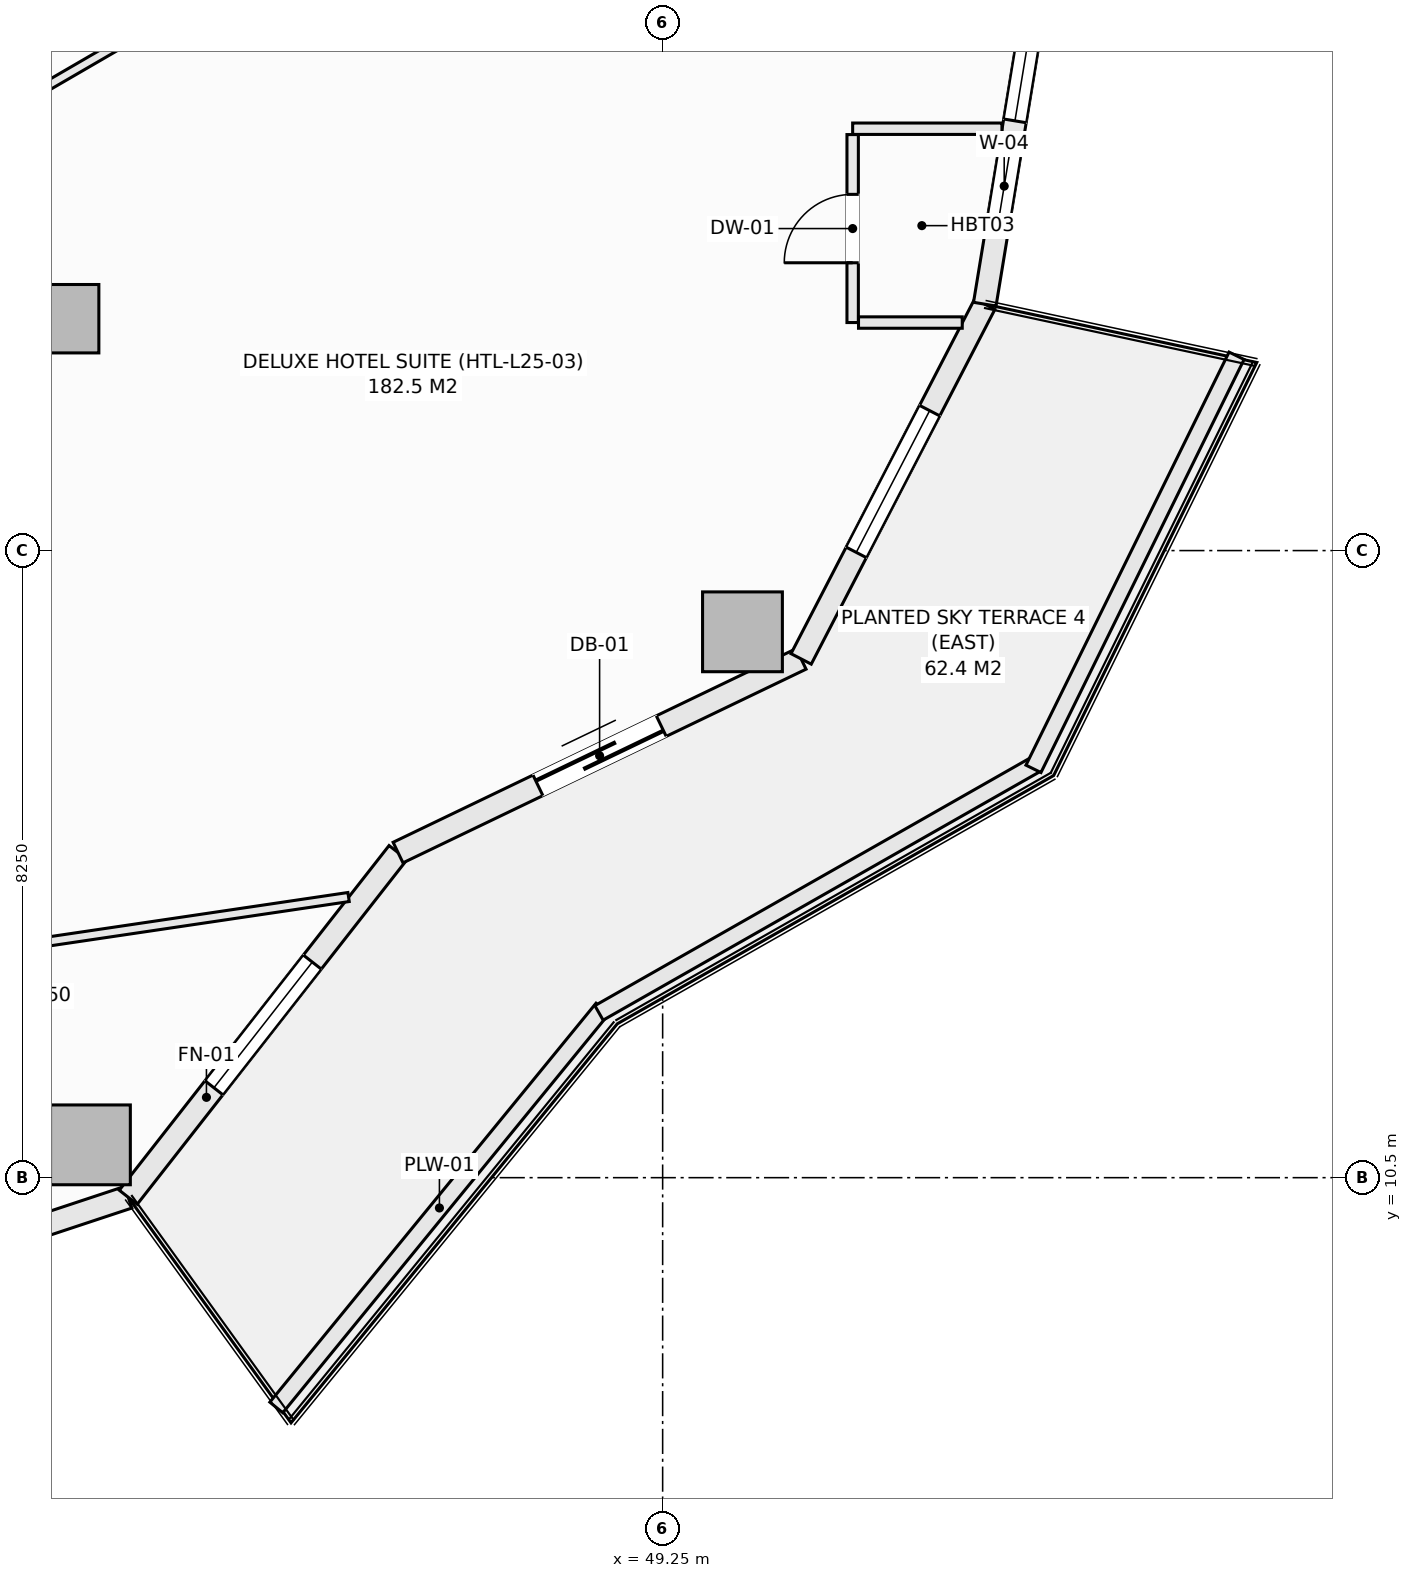
"""IFC4 building model, lengths in metres.
Left out: names, types, materials, properties, quantities, classifications, styles, units other than length and angle.
Written with IfcOpenShell. Run it as: python <this file> out.ifc"""

import sys

from ifc_helpers import new_model, si_unit, direction, frame, frame_2d, origin, origin_2d, place, context, subcontext, project, spatial, rectangle, extrude, element, fill, save


model = new_model("IFC4")
c1 = context("Model", 3, precision=1e-05, world=origin(), true_north=direction((0.0, 1.0)))
c2 = subcontext(c1, "Body", "Model", "MODEL_VIEW")
j1 = project(units=[si_unit("LENGTHUNIT", "METRE"), si_unit("PLANEANGLEUNIT", "RADIAN")], contexts=[c1])
p1 = place(None, origin())
s1 = spatial("IfcSite", under=j1, at=p1, CompositionType="ELEMENT")
p2 = place(p1, origin())
s2 = spatial("IfcBuilding", under=s1, at=p2, CompositionType="ELEMENT")
p3 = place(p2, frame((0.0, 0.0, 105.3)))
s3 = spatial("IfcBuildingStorey", under=s2, at=p3, CompositionType="ELEMENT", Elevation=105.3)
for number, where, z_axis, x_axis in (
    (1, (41.721, 10.932, -0.27), (0.0, 0.0, 1.0), (1.0, 0.0, 0.0)),
    (2, (50.3, 17.681, -0.27), (0.0, 0.0, 1.0), (1.0, 0.0, 0.0)),
):
    element("IfcColumn", number, at=place(p3, frame(where, z_axis=z_axis, x_axis=x_axis)), inside=s3, PredefinedType="COLUMN", context=c2, shape_type="SweptSolid", body=[
        extrude(rectangle(XDim=1.05, YDim=1.05, at=origin_2d()), origin(), (0.0, 0.0, 1.0), 3.4),
    ])
p4 = place(p3, frame((41.382, 21.801, -0.27), z_axis=(0.0, 0.0, 1.0), x_axis=(1.0, 0.0, 0.0)))
e3 = element("IfcColumn", 3, at=p4, inside=s3, PredefinedType="COLUMN", context=c2, shape_type="SweptSolid", body=[
    extrude(rectangle(XDim=0.9, YDim=0.9, at=origin_2d()), origin(), (0.0, 0.0, 1.0), 3.4),
])
p5 = place(p3, frame((36.385, 8.309, 0.0), z_axis=(0.0, 0.0, 1.0), x_axis=(0.949238009374, 0.314558741032, 0.0)))
e4 = element("IfcWall", 4, at=p5, inside=s3, PredefinedType="SOLIDWALL", context=c2, shape_type="SweptSolid", body=[
    extrude(rectangle(XDim=6.146, YDim=0.3, at=frame_2d((3.073, 0.0))), origin(), (0.0, 0.0, 1.0), 2.653),
])
p6 = place(p5, frame((0.685, 0.0, 0.74)))
e5 = element("IfcOpeningElement", 5, at=p6, cuts=e4, PredefinedType="OPENING", context=c2, shape_type="SweptSolid", body=[
    extrude(rectangle(XDim=1.2, YDim=1.7, at=frame_2d((0.6, 0.85))), frame((0.0, 0.16, 0.0), z_axis=(0.0, -1.0, 0.0), x_axis=(1.0, 0.0, 0.0)), (0.0, 0.0, 1.0), 0.32),
])
p7 = place(p5, frame((2.166, 0.0, 0.74)))
e6 = element("IfcOpeningElement", 6, at=p7, cuts=e4, PredefinedType="OPENING", context=c2, shape_type="SweptSolid", body=[
    extrude(rectangle(XDim=1.2, YDim=1.7, at=frame_2d((0.6, 0.85))), frame((0.0, 0.16, 0.0), z_axis=(0.0, -1.0, 0.0), x_axis=(1.0, 0.0, 0.0)), (0.0, 0.0, 1.0), 0.32),
])
p8 = place(p3, frame((42.219, 10.242, 0.0), z_axis=(0.0, 0.0, 1.0), x_axis=(0.616435134162, 0.787405693001, 0.0)))
e7 = element("IfcWall", 7, at=p8, inside=s3, PredefinedType="SOLIDWALL", context=c2, shape_type="SweptSolid", body=[
    extrude(rectangle(XDim=5.759, YDim=0.3, at=frame_2d((2.879, 0.0))), origin(), (0.0, 0.0, 1.0), 2.653),
])
p9 = place(p8, frame((1.829, 0.0, 0.74)))
e8 = element("IfcOpeningElement", 8, at=p9, cuts=e7, PredefinedType="OPENING", context=c2, shape_type="SweptSolid", body=[
    extrude(rectangle(XDim=2.1, YDim=1.7, at=frame_2d((1.05, 0.85))), frame((0.0, 0.16, 0.0), z_axis=(0.0, -1.0, 0.0), x_axis=(1.0, 0.0, 0.0)), (0.0, 0.0, 1.0), 0.32),
])
p10 = place(p3, frame((45.769, 14.777, 0.0), z_axis=(0.0, 0.0, 1.0), x_axis=(0.901370184739, 0.433049408339, 0.0)))
e9 = element("IfcWall", 9, at=p10, inside=s3, PredefinedType="SOLIDWALL", context=c2, shape_type="SweptSolid", body=[
    extrude(rectangle(XDim=5.884, YDim=0.3, at=frame_2d((2.942, 0.0))), origin(), (0.0, 0.0, 1.0), 2.653),
])
p11 = place(p10, frame((2.042, 0.0, 0.0)))
e10 = element("IfcOpeningElement", 10, at=p11, cuts=e9, PredefinedType="OPENING", context=c2, shape_type="SweptSolid", body=[
    extrude(rectangle(XDim=1.8, YDim=2.25, at=frame_2d((0.9, 1.125))), frame((0.0, 0.16, 0.0), z_axis=(0.0, -1.0, 0.0), x_axis=(1.0, 0.0, 0.0)), (0.0, 0.0, 1.0), 0.32),
])
p12 = place(p3, frame((51.072, 17.325, 0.0), z_axis=(0.0, 0.0, 1.0), x_axis=(0.459767899643, 0.888039119892, 0.0)))
e11 = element("IfcWall", 11, at=p12, inside=s3, PredefinedType="SOLIDWALL", context=c2, shape_type="SweptSolid", body=[
    extrude(rectangle(XDim=5.255, YDim=0.3, at=frame_2d((2.628, 0.0))), origin(), (0.0, 0.0, 1.0), 2.653),
])
p13 = place(p12, frame((1.578, 0.0, 0.74)))
e12 = element("IfcOpeningElement", 12, at=p13, cuts=e11, PredefinedType="OPENING", context=c2, shape_type="SweptSolid", body=[
    extrude(rectangle(XDim=2.1, YDim=1.7, at=frame_2d((1.05, 0.85))), frame((0.0, 0.16, 0.0), z_axis=(0.0, -1.0, 0.0), x_axis=(1.0, 0.0, 0.0)), (0.0, 0.0, 1.0), 0.32),
])
p14 = place(p3, frame((53.488, 21.992, 0.0), z_axis=(0.0, 0.0, 1.0), x_axis=(0.162393944769, 0.986726003864, 0.0)))
e13 = element("IfcWall", 13, at=p14, inside=s3, PredefinedType="SOLIDWALL", context=c2, shape_type="SweptSolid", body=[
    extrude(rectangle(XDim=5.075, YDim=0.3, at=frame_2d((2.538, 0.0))), origin(), (0.0, 0.0, 1.0), 2.653),
])
p15 = place(p14, frame((0.974, 0.0, 0.74)))
e14 = element("IfcOpeningElement", 14, at=p15, cuts=e13, PredefinedType="OPENING", context=c2, shape_type="SweptSolid", body=[
    extrude(rectangle(XDim=1.2, YDim=1.7, at=frame_2d((0.6, 0.85))), frame((0.0, 0.16, 0.0), z_axis=(0.0, -1.0, 0.0), x_axis=(1.0, 0.0, 0.0)), (0.0, 0.0, 1.0), 0.32),
])
p16 = place(p14, frame((2.444, 0.0, 0.74)))
e15 = element("IfcOpeningElement", 15, at=p16, cuts=e13, PredefinedType="OPENING", context=c2, shape_type="SweptSolid", body=[
    extrude(rectangle(XDim=1.2, YDim=1.7, at=frame_2d((0.6, 0.85))), frame((0.0, 0.16, 0.0), z_axis=(0.0, -1.0, 0.0), x_axis=(1.0, 0.0, 0.0)), (0.0, 0.0, 1.0), 0.32),
])
p17 = place(p3, frame((44.167, 7.477, 0.0), z_axis=(0.0, 0.0, 1.0), x_axis=(0.633002467947, 0.77414977593, 0.0)))
e16 = element("IfcWall", 16, at=p17, inside=s3, PredefinedType="PARAPET", context=c2, shape_type="SweptSolid", body=[
    extrude(rectangle(XDim=6.78, YDim=0.22, at=frame_2d((3.39, 0.0))), origin(), (0.0, 0.0, 1.0), 0.52),
])
p18 = place(p3, frame((48.413, 12.668, 0.0), z_axis=(0.0, 0.0, 1.0), x_axis=(0.869187658335, 0.494482370361, 0.0)))
e17 = element("IfcWall", 17, at=p18, inside=s3, PredefinedType="PARAPET", context=c2, shape_type="SweptSolid", body=[
    extrude(rectangle(XDim=6.606, YDim=0.22, at=frame_2d((3.303, 0.0))), origin(), (0.0, 0.0, 1.0), 0.52),
])
p19 = place(p3, frame((54.129, 15.878, 0.0), z_axis=(0.0, 0.0, 1.0), x_axis=(0.441269631716, 0.897374566235, 0.0)))
e18 = element("IfcWall", 18, at=p19, inside=s3, PredefinedType="PARAPET", context=c2, shape_type="SweptSolid", body=[
    extrude(rectangle(XDim=6.056, YDim=0.22, at=frame_2d((3.028, 0.0))), origin(), (0.0, 0.0, 1.0), 0.52),
])
p20 = place(p3, frame((36.012, 12.843, 0.0), z_axis=(0.0, 0.0, 1.0), x_axis=(0.989205313502, 0.146536165297, 0.0)))
e19 = element("IfcWall", 19, at=p20, inside=s3, PredefinedType="PARTITIONING", context=c2, shape_type="SweptSolid", body=[
    extrude(rectangle(XDim=9.205, YDim=0.12, at=frame_2d((4.603, 0.0))), origin(), (0.0, 0.0, 1.0), 3.13),
])
p21 = place(p3, frame((51.75, 24.3, 0.0), z_axis=(0.0, 0.0, 1.0), x_axis=(1.0, 0.0, 0.0)))
e20 = element("IfcWall", 20, at=p21, inside=s3, PredefinedType="PARTITIONING", context=c2, shape_type="SweptSolid", body=[
    extrude(rectangle(XDim=1.964, YDim=0.15, at=frame_2d((0.982, 0.0))), origin(), (0.0, 0.0, 1.0), 3.13),
])
p22 = place(p3, frame((51.75, 21.75, 0.0), z_axis=(0.0, 0.0, 1.0), x_axis=(0.0, 1.0, 0.0)))
e21 = element("IfcWall", 21, at=p22, inside=s3, PredefinedType="PARTITIONING", context=c2, shape_type="SweptSolid", body=[
    extrude(rectangle(XDim=2.473, YDim=0.15, at=frame_2d((1.236, 0.0))), origin(), (0.0, 0.0, 1.0), 2.653),
])
p23 = place(p22, frame((0.787, 0.0, 0.0)))
e22 = element("IfcOpeningElement", 22, at=p23, cuts=e21, PredefinedType="OPENING", context=c2, shape_type="SweptSolid", body=[
    extrude(rectangle(XDim=0.9, YDim=2.1, at=frame_2d((0.45, 1.05))), frame((0.0, 0.085, 0.0), z_axis=(0.0, -1.0, 0.0), x_axis=(1.0, 0.0, 0.0)), (0.0, 0.0, 1.0), 0.17),
])
p24 = place(p3, frame((51.827, 21.75, 0.0), z_axis=(0.0, 0.0, 1.0), x_axis=(1.0, 0.0, 0.0)))
e23 = element("IfcWall", 23, at=p24, inside=s3, PredefinedType="PARTITIONING", context=c2, shape_type="SweptSolid", body=[
    extrude(rectangle(XDim=1.365, YDim=0.15, at=frame_2d((0.683, 0.0))), origin(), (0.0, 0.0, 1.0), 3.13),
])
p25 = place(p3, frame((38.962, 23.589, 0.0), z_axis=(0.0, 0.0, 1.0), x_axis=(0.864680370076, 0.502322463768, 0.0)))
e24 = element("IfcWall", 24, at=p25, inside=s3, PredefinedType="PARTITIONING", context=c2, shape_type="SweptSolid", body=[
    extrude(rectangle(XDim=16.634, YDim=0.12, at=frame_2d((8.317, 0.0))), origin(), (0.0, 0.0, 1.0), 2.505),
])
p26 = place(p9, origin())
e25 = element("IfcWindow", 25, at=p26, inside=s3, PartitioningType="SINGLE_PANEL", PredefinedType="WINDOW", context=c2, shape_type="SweptSolid", body=[
    extrude(rectangle(XDim=2.1, YDim=1.7, at=frame_2d((1.05, 0.85))), frame((0.0, 0.03, 0.0), z_axis=(0.0, -1.0, 0.0), x_axis=(1.0, 0.0, 0.0)), (0.0, 0.0, 1.0), 0.06),
])
fill(e8, e25)
p27 = place(p11, frame((1.8, 0.0, 0.0), z_axis=(0.0, 0.0, 1.0), x_axis=(-1.0, 0.0, 0.0)))
e26 = element("IfcDoor", 26, at=p27, inside=s3, OperationType="SLIDING_TO_LEFT", PredefinedType="DOOR", context=c2, shape_type="SweptSolid", body=[
    extrude(rectangle(XDim=1.8, YDim=2.25, at=frame_2d((0.9, 1.125))), frame((0.0, 0.025, 0.0), z_axis=(0.0, -1.0, 0.0), x_axis=(1.0, 0.0, 0.0)), (0.0, 0.0, 1.0), 0.05),
])
fill(e10, e26)
p28 = place(p13, origin())
e27 = element("IfcWindow", 27, at=p28, inside=s3, PartitioningType="SINGLE_PANEL", PredefinedType="WINDOW", context=c2, shape_type="SweptSolid", body=[
    extrude(rectangle(XDim=2.1, YDim=1.7, at=frame_2d((1.05, 0.85))), frame((0.0, 0.03, 0.0), z_axis=(0.0, -1.0, 0.0), x_axis=(1.0, 0.0, 0.0)), (0.0, 0.0, 1.0), 0.06),
])
fill(e12, e27)
p29 = place(p15, origin())
e28 = element("IfcWindow", 28, at=p29, inside=s3, PartitioningType="SINGLE_PANEL", PredefinedType="WINDOW", context=c2, shape_type="SweptSolid", body=[
    extrude(rectangle(XDim=1.2, YDim=1.7, at=frame_2d((0.6, 0.85))), frame((0.0, 0.03, 0.0), z_axis=(0.0, -1.0, 0.0), x_axis=(1.0, 0.0, 0.0)), (0.0, 0.0, 1.0), 0.06),
])
fill(e14, e28)
p30 = place(p23, origin())
e29 = element("IfcDoor", 29, at=p30, inside=s3, OperationType="SINGLE_SWING_LEFT", PredefinedType="DOOR", context=c2, shape_type="SweptSolid", body=[
    extrude(rectangle(XDim=0.9, YDim=2.1, at=frame_2d((0.45, 1.05))), frame((0.0, 0.025, 0.0), z_axis=(0.0, -1.0, 0.0), x_axis=(1.0, 0.0, 0.0)), (0.0, 0.0, 1.0), 0.05),
])
fill(e22, e29)
p31 = place(p16, origin())
e30 = element("IfcWindow", 30, at=p31, inside=s3, PartitioningType="SINGLE_PANEL", PredefinedType="WINDOW", context=c2, shape_type="SweptSolid", body=[
    extrude(rectangle(XDim=1.2, YDim=1.7, at=frame_2d((0.6, 0.85))), frame((0.0, 0.03, 0.0), z_axis=(0.0, -1.0, 0.0), x_axis=(1.0, 0.0, 0.0)), (0.0, 0.0, 1.0), 0.06),
])
fill(e15, e30)
save(model, sys.argv[1])
